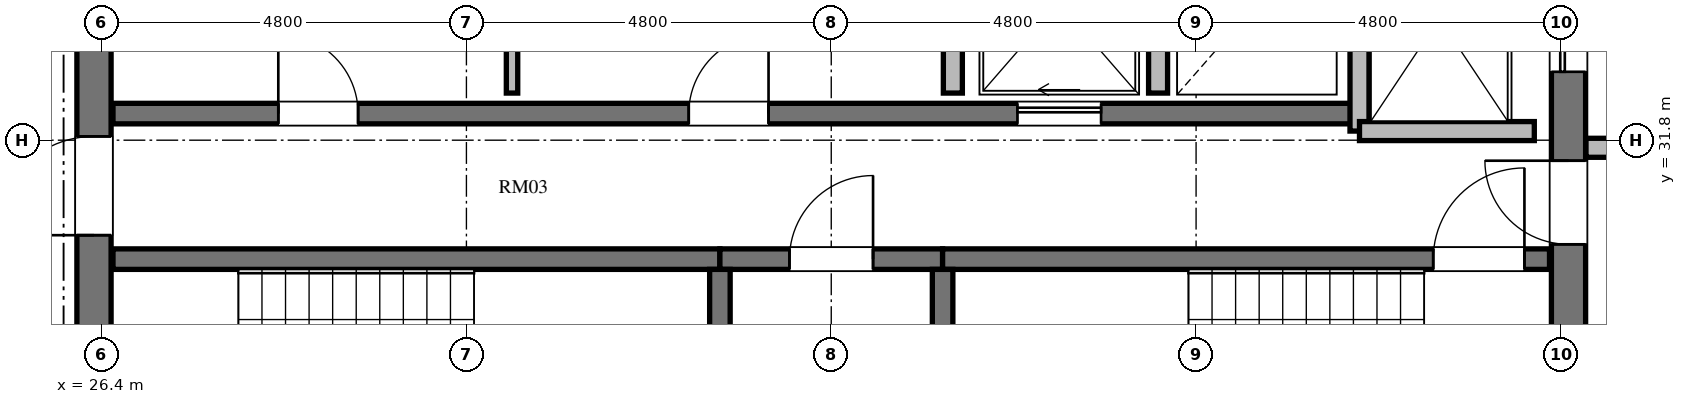
"""IFC4 building model, lengths in metres.
Left out: names, types, materials, properties, quantities, classifications, styles, units other than length and angle.
Written with IfcOpenShell. Run it as: python <this file> out.ifc"""

import sys

from ifc_helpers import new_model, si_unit, direction, frame, frame_2d, origin, place, context, subcontext, project, spatial, rectangle, extrude, element, fill, save


model = new_model("IFC4")
c1 = context("Model", 3, precision=1e-05, world=origin(), true_north=direction((0.0, 1.0)))
c2 = subcontext(c1, "Body", "Model", "MODEL_VIEW")
j1 = project(units=[si_unit("LENGTHUNIT", "METRE"), si_unit("PLANEANGLEUNIT", "RADIAN")], contexts=[c1])
p1 = place(None, origin())
s1 = spatial("IfcSite", under=j1, at=p1, CompositionType="ELEMENT")
p2 = place(p1, origin())
s2 = spatial("IfcBuilding", under=s1, at=p2, CompositionType="ELEMENT")
p3 = place(p2, frame((0.0, 0.0, 302.448)))
s3 = spatial("IfcBuildingStorey", under=s2, at=p3, CompositionType="ELEMENT", Elevation=302.448)
p4 = place(p3, frame((26.3, 20.95, 0.0), z_axis=(0.0, 0.0, 1.0), x_axis=(0.0, 1.0, 0.0)))
e1 = element("IfcWall", 1, at=p4, inside=s3, PredefinedType="SHEAR", context=c2, shape_type="SweptSolid", body=[
    extrude(rectangle(XDim=14.1, YDim=0.45, at=frame_2d((7.05, 0.0))), origin(), (0.0, 0.0, 1.0), 3.388),
])
p5 = place(p4, frame((6.5, 0.0, 0.0)))
e2 = element("IfcOpeningElement", 2, at=p5, cuts=e1, PredefinedType="OPENING", context=c2, shape_type="SweptSolid", body=[
    extrude(rectangle(XDim=1.2, YDim=2.15, at=frame_2d((0.6, 1.075))), frame((0.0, 0.235, 0.0), z_axis=(0.0, -1.0, 0.0), x_axis=(1.0, 0.0, 0.0)), (0.0, 0.0, 1.0), 0.47),
])
p6 = place(p4, frame((9.6, 0.0, 0.0)))
e3 = element("IfcOpeningElement", 3, at=p6, cuts=e1, PredefinedType="OPENING", context=c2, shape_type="SweptSolid", body=[
    extrude(rectangle(XDim=1.3, YDim=2.2, at=frame_2d((0.65, 1.1))), frame((0.0, 0.235, 0.0), z_axis=(0.0, -1.0, 0.0), x_axis=(1.0, 0.0, 0.0)), (0.0, 0.0, 1.0), 0.47),
])
p7 = place(p4, frame((3.26, 0.0, 0.0)))
e4 = element("IfcOpeningElement", 4, at=p7, cuts=e1, PredefinedType="OPENING", context=c2, shape_type="SweptSolid", body=[
    extrude(rectangle(XDim=1.3, YDim=2.2, at=frame_2d((0.65, 1.1))), frame((0.0, 0.235, 0.0), z_axis=(0.0, -1.0, 0.0), x_axis=(1.0, 0.0, 0.0)), (0.0, 0.0, 1.0), 0.47),
])
p8 = place(p3, frame((45.7, 20.95, 0.0), z_axis=(0.0, 0.0, 1.0), x_axis=(0.0, 1.0, 0.0)))
e5 = element("IfcWall", 5, at=p8, inside=s3, PredefinedType="SHEAR", context=c2, shape_type="SweptSolid", body=[
    extrude(rectangle(XDim=14.1, YDim=0.45, at=frame_2d((7.05, 0.0))), origin(), (0.0, 0.0, 1.0), 3.388),
])
p9 = place(p8, frame((11.75, 0.0, 0.0)))
e6 = element("IfcOpeningElement", 6, at=p9, cuts=e5, PredefinedType="OPENING", context=c2, shape_type="SweptSolid", body=[
    extrude(rectangle(XDim=1.4, YDim=2.3, at=frame_2d((0.7, 1.15))), frame((0.0, 0.235, 0.0), z_axis=(0.0, -1.0, 0.0), x_axis=(1.0, 0.0, 0.0)), (0.0, 0.0, 1.0), 0.47),
])
p10 = place(p8, frame((0.95, 0.0, 0.0)))
e7 = element("IfcOpeningElement", 7, at=p10, cuts=e5, PredefinedType="OPENING", context=c2, shape_type="SweptSolid", body=[
    extrude(rectangle(XDim=1.4, YDim=2.3, at=frame_2d((0.7, 1.15))), frame((0.0, 0.235, 0.0), z_axis=(0.0, -1.0, 0.0), x_axis=(1.0, 0.0, 0.0)), (0.0, 0.0, 1.0), 0.47),
])
p11 = place(p8, frame((9.48, 0.0, 0.0)))
e8 = element("IfcOpeningElement", 8, at=p11, cuts=e5, PredefinedType="OPENING", context=c2, shape_type="SweptSolid", body=[
    extrude(rectangle(XDim=1.1, YDim=2.15, at=frame_2d((0.55, 1.075))), frame((0.0, 0.235, 0.0), z_axis=(0.0, -1.0, 0.0), x_axis=(1.0, 0.0, 0.0)), (0.0, 0.0, 1.0), 0.47),
])
p12 = place(p3, frame((26.55, 30.235, 0.0), z_axis=(0.0, 0.0, 1.0), x_axis=(1.0, 0.0, 0.0)))
e9 = element("IfcWall", 9, at=p12, inside=s3, PredefinedType="SHEAR", context=c2, shape_type="SweptSolid", body=[
    extrude(rectangle(XDim=7.985, YDim=0.27, at=frame_2d((3.992, 0.0))), origin(), (0.0, 0.0, 1.0), 3.388),
])
p13 = place(p3, frame((34.535, 30.235, 0.0), z_axis=(0.0, 0.0, 1.0), x_axis=(1.0, 0.0, 0.0)))
e10 = element("IfcWall", 10, at=p13, inside=s3, PredefinedType="SHEAR", context=c2, shape_type="SweptSolid", body=[
    extrude(rectangle(XDim=2.93, YDim=0.27, at=frame_2d((1.465, 0.0))), origin(), (0.0, 0.0, 1.0), 3.388),
])
p14 = place(p13, frame((0.915, 0.0, 0.0)))
e11 = element("IfcOpeningElement", 11, at=p14, cuts=e10, PredefinedType="OPENING", context=c2, shape_type="SweptSolid", body=[
    extrude(rectangle(XDim=1.1, YDim=2.15, at=frame_2d((0.55, 1.075))), frame((0.0, 0.145, 0.0), z_axis=(0.0, -1.0, 0.0), x_axis=(1.0, 0.0, 0.0)), (0.0, 0.0, 1.0), 0.29),
])
p15 = place(p3, frame((37.465, 30.235, 0.0), z_axis=(0.0, 0.0, 1.0), x_axis=(1.0, 0.0, 0.0)))
e12 = element("IfcWall", 12, at=p15, inside=s3, PredefinedType="SHEAR", context=c2, shape_type="SweptSolid", body=[
    extrude(rectangle(XDim=7.985, YDim=0.27, at=frame_2d((3.992, 0.0))), origin(), (0.0, 0.0, 1.0), 3.388),
])
p16 = place(p15, frame((6.455, 0.0, 0.0)))
e13 = element("IfcOpeningElement", 13, at=p16, cuts=e12, PredefinedType="OPENING", context=c2, shape_type="SweptSolid", body=[
    extrude(rectangle(XDim=1.2, YDim=2.15, at=frame_2d((0.6, 1.075))), frame((0.0, 0.145, 0.0), z_axis=(0.0, -1.0, 0.0), x_axis=(1.0, 0.0, 0.0)), (0.0, 0.0, 1.0), 0.29),
])
for number, where, z_axis, x_axis in (
    (14, (34.535, 26.02, 0.0), (0.0, 0.0, 1.0), (0.0, 1.0, 0.0)),
    (15, (37.465, 26.02, 0.0), (0.0, 0.0, 1.0), (0.0, 1.0, 0.0)),
):
    element("IfcWall", number, at=place(p3, frame(where, z_axis=z_axis, x_axis=x_axis)), inside=s3, PredefinedType="SHEAR", context=c2, shape_type="SweptSolid", body=[
        extrude(rectangle(XDim=4.08, YDim=0.27, at=frame_2d((2.04, 0.0))), origin(), (0.0, 0.0, 1.0), 3.388),
    ])
p17 = place(p3, frame((26.55, 32.15, 0.0), z_axis=(0.0, 0.0, 1.0), x_axis=(1.0, 0.0, 0.0)))
e16 = element("IfcWall", 16, at=p17, inside=s3, PredefinedType="SHEAR", context=c2, shape_type="SweptSolid", body=[
    extrude(rectangle(XDim=16.4, YDim=0.27, at=frame_2d((8.2, 0.0))), origin(), (0.0, 0.0, 1.0), 3.388),
])
p18 = place(p17, frame((2.175, 0.0, 0.0)))
e17 = element("IfcOpeningElement", 17, at=p18, cuts=e16, PredefinedType="OPENING", context=c2, shape_type="SweptSolid", body=[
    extrude(rectangle(XDim=1.05, YDim=2.15, at=frame_2d((0.525, 1.075))), frame((0.0, 0.145, 0.0), z_axis=(0.0, -1.0, 0.0), x_axis=(1.0, 0.0, 0.0)), (0.0, 0.0, 1.0), 0.29),
])
p19 = place(p17, frame((7.575, 0.0, 0.0)))
e18 = element("IfcOpeningElement", 18, at=p19, cuts=e16, PredefinedType="OPENING", context=c2, shape_type="SweptSolid", body=[
    extrude(rectangle(XDim=1.05, YDim=2.15, at=frame_2d((0.525, 1.075))), frame((0.0, 0.145, 0.0), z_axis=(0.0, -1.0, 0.0), x_axis=(1.0, 0.0, 0.0)), (0.0, 0.0, 1.0), 0.29),
])
p20 = place(p17, frame((11.9, 0.0, 0.0)))
e19 = element("IfcOpeningElement", 19, at=p20, cuts=e16, PredefinedType="OPENING", context=c2, shape_type="SweptSolid", body=[
    extrude(rectangle(XDim=1.1, YDim=2.2, at=frame_2d((0.55, 1.1))), frame((0.0, 0.145, 0.0), z_axis=(0.0, -1.0, 0.0), x_axis=(1.0, 0.0, 0.0)), (0.0, 0.0, 1.0), 0.29),
])
p21 = place(p3, frame((42.95, 31.92, 0.0), z_axis=(0.0, 0.0, 1.0), x_axis=(0.0, 1.0, 0.0)))
e20 = element("IfcWall", 20, at=p21, inside=s3, PredefinedType="SOLIDWALL", context=c2, shape_type="SweptSolid", body=[
    extrude(rectangle(XDim=3.18, YDim=0.25, at=frame_2d((1.59, 0.0))), origin(), (0.0, 0.0, 1.0), 3.068),
])
p22 = place(p3, frame((42.95, 31.92, 0.0), z_axis=(0.0, 0.0, 1.0), x_axis=(1.0, 0.0, 0.0)))
e21 = element("IfcWall", 21, at=p22, inside=s3, PredefinedType="SOLIDWALL", context=c2, shape_type="SweptSolid", body=[
    extrude(rectangle(XDim=2.3, YDim=0.25, at=frame_2d((1.15, 0.0))), origin(), (0.0, 0.0, 1.0), 3.068),
])
for number, where, z_axis, x_axis in (
    (22, (37.6, 32.42, 0.0), (0.0, 0.0, 1.0), (0.0, 1.0, 0.0)),
    (23, (40.3, 32.42, 0.0), (0.0, 0.0, 1.0), (0.0, 1.0, 0.0)),
):
    element("IfcWall", number, at=place(p3, frame(where, z_axis=z_axis, x_axis=x_axis)), inside=s3, PredefinedType="SOLIDWALL", context=c2, shape_type="SweptSolid", body=[
        extrude(rectangle(XDim=2.68, YDim=0.25, at=frame_2d((1.34, 0.0))), origin(), (0.0, 0.0, 1.0), 3.068),
    ])
p23 = place(p3, frame((31.8, 32.42, 0.0), z_axis=(0.0, 0.0, 1.0), x_axis=(0.0, 1.0, 0.0)))
e24 = element("IfcWall", 24, at=p23, inside=s3, PredefinedType="PARTITIONING", context=c2, shape_type="SweptSolid", body=[
    extrude(rectangle(XDim=2.68, YDim=0.15, at=frame_2d((1.34, 0.0))), origin(), (0.0, 0.0, 1.0), 3.068),
])
p24 = place(p3, frame((45.93, 31.7, 0.0), z_axis=(0.0, 0.0, 1.0), x_axis=(1.0, 0.0, 0.0)))
e25 = element("IfcWall", 25, at=p24, inside=s3, PredefinedType="SOLIDWALL", context=c2, shape_type="SweptSolid", body=[
    extrude(rectangle(XDim=2.52, YDim=0.25, at=frame_2d((1.26, 0.0))), origin(), (0.0, 0.0, 1.0), 3.068),
])
p25 = place(p16, origin())
e26 = element("IfcDoor", 26, at=p25, inside=s3, OperationType="SINGLE_SWING_RIGHT", PredefinedType="DOOR", context=c2, shape_type="SweptSolid", body=[
    extrude(rectangle(XDim=1.2, YDim=2.15, at=frame_2d((0.6, 1.075))), frame((0.0, 0.025, 0.0), z_axis=(0.0, -1.0, 0.0), x_axis=(1.0, 0.0, 0.0)), (0.0, 0.0, 1.0), 0.05),
])
fill(e13, e26)
p26 = place(p14, origin())
e27 = element("IfcDoor", 27, at=p26, inside=s3, OperationType="SINGLE_SWING_RIGHT", PredefinedType="DOOR", context=c2, shape_type="SweptSolid", body=[
    extrude(rectangle(XDim=1.1, YDim=2.15, at=frame_2d((0.55, 1.075))), frame((0.0, 0.025, 0.0), z_axis=(0.0, -1.0, 0.0), x_axis=(1.0, 0.0, 0.0)), (0.0, 0.0, 1.0), 0.05),
])
fill(e11, e27)
p27 = place(p6, origin())
e28 = element("IfcDoor", 28, at=p27, inside=s3, OperationType="SINGLE_SWING_LEFT", PredefinedType="DOOR", context=c2, shape_type="SweptSolid", body=[
    extrude(rectangle(XDim=1.3, YDim=2.2, at=frame_2d((0.65, 1.1))), frame((0.0, 0.025, 0.0), z_axis=(0.0, -1.0, 0.0), x_axis=(1.0, 0.0, 0.0)), (0.0, 0.0, 1.0), 0.05),
])
fill(e3, e28)
p28 = place(p18, origin())
e29 = element("IfcDoor", 29, at=p28, inside=s3, OperationType="SINGLE_SWING_LEFT", PredefinedType="DOOR", context=c2, shape_type="SweptSolid", body=[
    extrude(rectangle(XDim=1.05, YDim=2.15, at=frame_2d((0.525, 1.075))), frame((0.0, 0.025, 0.0), z_axis=(0.0, -1.0, 0.0), x_axis=(1.0, 0.0, 0.0)), (0.0, 0.0, 1.0), 0.05),
])
fill(e17, e29)
p29 = place(p19, origin())
e30 = element("IfcDoor", 30, at=p29, inside=s3, OperationType="SINGLE_SWING_RIGHT", PredefinedType="DOOR", context=c2, shape_type="SweptSolid", body=[
    extrude(rectangle(XDim=1.05, YDim=2.15, at=frame_2d((0.525, 1.075))), frame((0.0, 0.025, 0.0), z_axis=(0.0, -1.0, 0.0), x_axis=(1.0, 0.0, 0.0)), (0.0, 0.0, 1.0), 0.05),
])
fill(e18, e30)
p30 = place(p20, origin())
e31 = element("IfcDoor", 31, at=p30, inside=s3, OperationType="SLIDING_TO_LEFT", PredefinedType="DOOR", context=c2, shape_type="SweptSolid", body=[
    extrude(rectangle(XDim=1.1, YDim=2.2, at=frame_2d((0.55, 1.1))), frame((0.0, 0.025, 0.0), z_axis=(0.0, -1.0, 0.0), x_axis=(1.0, 0.0, 0.0)), (0.0, 0.0, 1.0), 0.05),
])
fill(e19, e31)
p31 = place(p9, origin())
e32 = element("IfcDoor", 32, at=p31, inside=s3, OperationType="SLIDING_TO_LEFT", PredefinedType="DOOR", context=c2, shape_type="SweptSolid", body=[
    extrude(rectangle(XDim=1.4, YDim=2.3, at=frame_2d((0.7, 1.15))), frame((0.0, 0.025, 0.0), z_axis=(0.0, -1.0, 0.0), x_axis=(1.0, 0.0, 0.0)), (0.0, 0.0, 1.0), 0.05),
])
fill(e6, e32)
p32 = place(p11, origin())
e33 = element("IfcDoor", 33, at=p32, inside=s3, OperationType="SINGLE_SWING_RIGHT", PredefinedType="DOOR", context=c2, shape_type="SweptSolid", body=[
    extrude(rectangle(XDim=1.1, YDim=2.15, at=frame_2d((0.55, 1.075))), frame((0.0, 0.025, 0.0), z_axis=(0.0, -1.0, 0.0), x_axis=(1.0, 0.0, 0.0)), (0.0, 0.0, 1.0), 0.05),
])
fill(e8, e33)
save(model, sys.argv[1])
